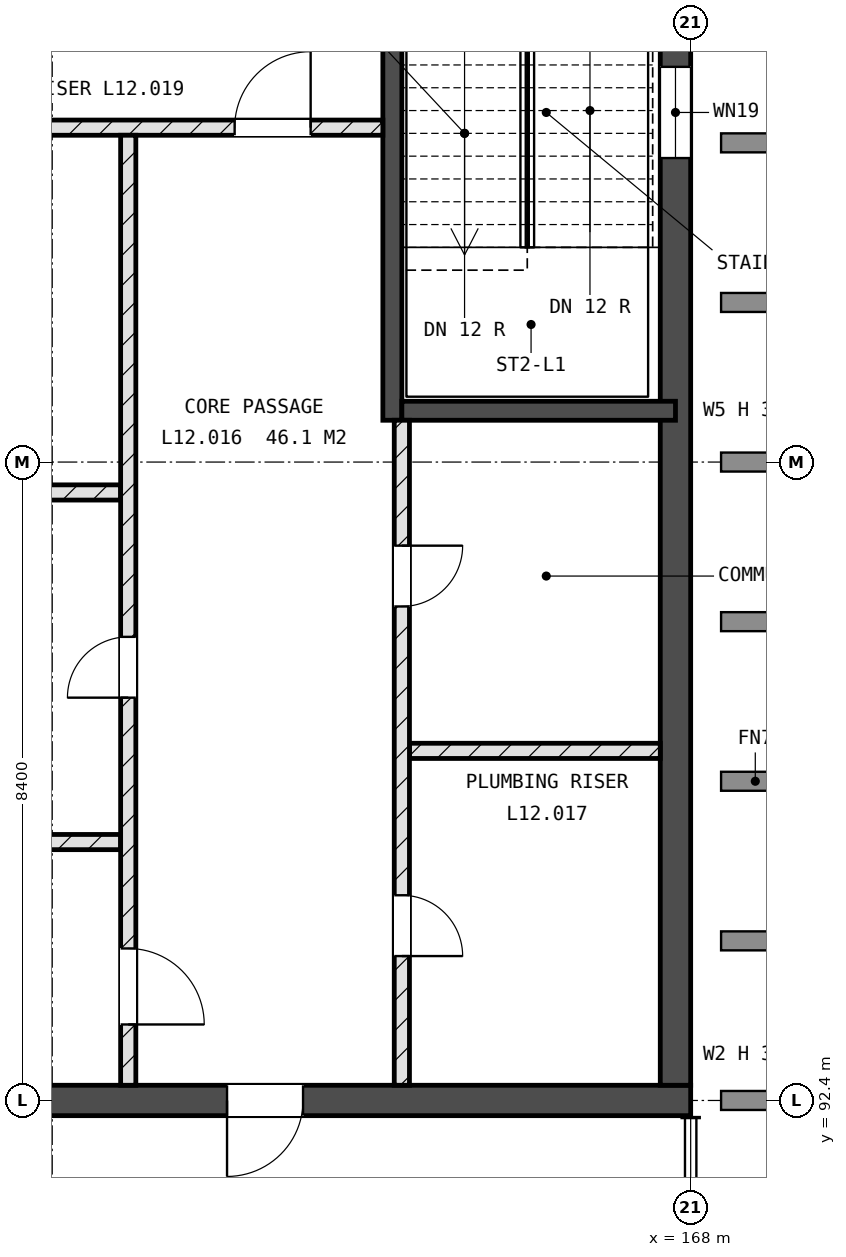
"""IFC4 building model, lengths in metres.
Left out: names, types, materials, properties, quantities, classifications, styles, units other than length and angle.
Written with IfcOpenShell. Run it as: python <this file> out.ifc"""

import sys

from ifc_helpers import new_model, si_unit, direction, frame, frame_2d, origin, place, context, subcontext, project, spatial, rectangle, extrude, element, fill, save


model = new_model("IFC4")
c1 = context("Model", 3, precision=1e-05, world=origin(), true_north=direction((0.0, 1.0)))
c2 = subcontext(c1, "Body", "Model", "MODEL_VIEW")
j1 = project(units=[si_unit("LENGTHUNIT", "METRE"), si_unit("PLANEANGLEUNIT", "RADIAN")], contexts=[c1])
p1 = place(None, origin())
s1 = spatial("IfcSite", under=j1, at=p1, CompositionType="ELEMENT")
p2 = place(p1, origin())
s2 = spatial("IfcBuilding", under=s1, at=p2, CompositionType="ELEMENT")
p3 = place(p2, frame((0.0, 0.0, 46.8)))
s3 = spatial("IfcBuildingStorey", under=s2, at=p3, CompositionType="ELEMENT", Elevation=46.8)
p4 = place(p3, frame((142.8, 92.4, -0.225), z_axis=(0.0, 0.0, 1.0), x_axis=(1.0, 0.0, 0.0)))
e1 = element("IfcWall", 1, at=p4, inside=s3, PredefinedType="SHEAR", context=c2, shape_type="SweptSolid", body=[
    extrude(rectangle(XDim=25.2, YDim=0.4, at=frame_2d((12.6, 0.0))), origin(), (0.0, 0.0, 1.0), 3.525),
])
p5 = place(p4, frame((1.4, 0.0, 0.225)))
e2 = element("IfcOpeningElement", 2, at=p5, cuts=e1, PredefinedType="OPENING", context=c2, shape_type="SweptSolid", body=[
    extrude(rectangle(XDim=1.0, YDim=2.1, at=frame_2d((0.5, 1.05))), frame((0.0, 0.21, 0.0), z_axis=(0.0, -1.0, 0.0), x_axis=(1.0, 0.0, 0.0)), (0.0, 0.0, 1.0), 0.42),
])
p6 = place(p4, frame((19.1, 0.0, 0.225)))
e3 = element("IfcOpeningElement", 3, at=p6, cuts=e1, PredefinedType="OPENING", context=c2, shape_type="SweptSolid", body=[
    extrude(rectangle(XDim=1.0, YDim=2.1, at=frame_2d((0.5, 1.05))), frame((0.0, 0.21, 0.0), z_axis=(0.0, -1.0, 0.0), x_axis=(1.0, 0.0, 0.0)), (0.0, 0.0, 1.0), 0.42),
])
p7 = place(p4, frame((10.4, 0.0, 0.225)))
e4 = element("IfcOpeningElement", 4, at=p7, cuts=e1, PredefinedType="OPENING", context=c2, shape_type="SweptSolid", body=[
    extrude(rectangle(XDim=1.0, YDim=2.1, at=frame_2d((0.5, 1.05))), frame((0.0, 0.21, 0.0), z_axis=(0.0, -1.0, 0.0), x_axis=(1.0, 0.0, 0.0)), (0.0, 0.0, 1.0), 0.42),
])
p8 = place(p3, frame((167.8, 92.6, -0.225), z_axis=(0.0, 0.0, 1.0), x_axis=(0.0, 1.0, 0.0)))
e5 = element("IfcWall", 5, at=p8, inside=s3, PredefinedType="SHEAR", context=c2, shape_type="SweptSolid", body=[
    extrude(rectangle(XDim=16.4, YDim=0.4, at=frame_2d((8.2, 0.0))), origin(), (0.0, 0.0, 1.0), 3.525),
])
p9 = place(p8, frame((12.2, 0.0, 1.825)))
e6 = element("IfcOpeningElement", 6, at=p9, cuts=e5, PredefinedType="OPENING", context=c2, shape_type="SweptSolid", body=[
    extrude(rectangle(XDim=1.2, YDim=0.9, at=frame_2d((0.6, 0.45))), frame((0.0, 0.21, 0.0), z_axis=(0.0, -1.0, 0.0), x_axis=(1.0, 0.0, 0.0)), (0.0, 0.0, 1.0), 0.42),
])
p10 = place(p3, frame((164.075, 101.35, -0.225), z_axis=(0.0, 0.0, 1.0), x_axis=(0.0, 1.0, 0.0)))
e7 = element("IfcWall", 7, at=p10, inside=s3, PredefinedType="SHEAR", context=c2, shape_type="SweptSolid", body=[
    extrude(rectangle(XDim=7.65, YDim=0.25, at=frame_2d((3.825, 0.0))), origin(), (0.0, 0.0, 1.0), 3.525),
])
p11 = place(p10, frame((6.55, 0.0, 0.225)))
e8 = element("IfcOpeningElement", 8, at=p11, cuts=e7, PredefinedType="OPENING", context=c2, shape_type="SweptSolid", body=[
    extrude(rectangle(XDim=1.0, YDim=2.1, at=frame_2d((0.5, 1.05))), frame((0.0, 0.135, 0.0), z_axis=(0.0, -1.0, 0.0), x_axis=(1.0, 0.0, 0.0)), (0.0, 0.0, 1.0), 0.27),
])
p12 = place(p3, frame((164.2, 101.475, -0.225), z_axis=(0.0, 0.0, 1.0), x_axis=(1.0, 0.0, 0.0)))
e9 = element("IfcWall", 9, at=p12, inside=s3, PredefinedType="SHEAR", context=c2, shape_type="SweptSolid", body=[
    extrude(rectangle(XDim=3.6, YDim=0.25, at=frame_2d((1.8, 0.0))), origin(), (0.0, 0.0, 1.0), 3.525),
])
p13 = place(p3, frame((158.25, 95.8, 0.0), z_axis=(0.0, 0.0, 1.0), x_axis=(1.0, 0.0, 0.0)))
e10 = element("IfcWall", 10, at=p13, inside=s3, PredefinedType="SOLIDWALL", context=c2, shape_type="SweptSolid", body=[
    extrude(rectangle(XDim=2.25, YDim=0.2, at=frame_2d((1.125, 0.0))), origin(), (0.0, 0.0, 1.0), 3.3),
])
p14 = place(p3, frame((164.3, 97.0, 0.0), z_axis=(0.0, 0.0, 1.0), x_axis=(1.0, 0.0, 0.0)))
e11 = element("IfcWall", 11, at=p14, inside=s3, PredefinedType="SOLIDWALL", context=c2, shape_type="SweptSolid", body=[
    extrude(rectangle(XDim=3.3, YDim=0.2, at=frame_2d((1.65, 0.0))), origin(), (0.0, 0.0, 1.0), 3.3),
])
p15 = place(p3, frame((146.5, 100.4, 0.0), z_axis=(0.0, 0.0, 1.0), x_axis=(1.0, 0.0, 0.0)))
e12 = element("IfcWall", 12, at=p15, inside=s3, PredefinedType="SOLIDWALL", context=c2, shape_type="SweptSolid", body=[
    extrude(rectangle(XDim=14.0, YDim=0.2, at=frame_2d((7.0, 0.0))), origin(), (0.0, 0.0, 1.0), 3.3),
])
p16 = place(p3, frame((143.2, 105.2, 0.0), z_axis=(0.0, 0.0, 1.0), x_axis=(1.0, 0.0, 0.0)))
e13 = element("IfcWall", 13, at=p16, inside=s3, PredefinedType="SOLIDWALL", context=c2, shape_type="SweptSolid", body=[
    extrude(rectangle(XDim=20.75, YDim=0.2, at=frame_2d((10.375, 0.0))), origin(), (0.0, 0.0, 1.0), 3.3),
])
p17 = place(p16, frame((11.5, 0.0, 0.0)))
e14 = element("IfcOpeningElement", 14, at=p17, cuts=e13, PredefinedType="OPENING", context=c2, shape_type="SweptSolid", body=[
    extrude(rectangle(XDim=0.8, YDim=2.1, at=frame_2d((0.4, 1.05))), frame((0.0, 0.11, 0.0), z_axis=(0.0, -1.0, 0.0), x_axis=(1.0, 0.0, 0.0)), (0.0, 0.0, 1.0), 0.22),
])
p18 = place(p16, frame((18.8, 0.0, 0.0)))
e15 = element("IfcOpeningElement", 15, at=p18, cuts=e13, PredefinedType="OPENING", context=c2, shape_type="SweptSolid", body=[
    extrude(rectangle(XDim=1.0, YDim=2.1, at=frame_2d((0.5, 1.05))), frame((0.0, 0.11, 0.0), z_axis=(0.0, -1.0, 0.0), x_axis=(1.0, 0.0, 0.0)), (0.0, 0.0, 1.0), 0.22),
])
p19 = place(p3, frame((160.6, 92.6, 0.0), z_axis=(0.0, 0.0, 1.0), x_axis=(0.0, 1.0, 0.0)))
e16 = element("IfcWall", 16, at=p19, inside=s3, PredefinedType="SOLIDWALL", context=c2, shape_type="SweptSolid", body=[
    extrude(rectangle(XDim=12.5, YDim=0.2, at=frame_2d((6.25, 0.0))), origin(), (0.0, 0.0, 1.0), 3.3),
])
p20 = place(p19, frame((5.1, 0.0, 0.0)))
e17 = element("IfcOpeningElement", 17, at=p20, cuts=e16, PredefinedType="OPENING", context=c2, shape_type="SweptSolid", body=[
    extrude(rectangle(XDim=0.8, YDim=2.1, at=frame_2d((0.4, 1.05))), frame((0.0, 0.11, 0.0), z_axis=(0.0, -1.0, 0.0), x_axis=(1.0, 0.0, 0.0)), (0.0, 0.0, 1.0), 0.22),
])
p21 = place(p19, frame((0.8, 0.0, 0.0)))
e18 = element("IfcOpeningElement", 18, at=p21, cuts=e16, PredefinedType="OPENING", context=c2, shape_type="SweptSolid", body=[
    extrude(rectangle(XDim=1.0, YDim=2.1, at=frame_2d((0.5, 1.05))), frame((0.0, 0.11, 0.0), z_axis=(0.0, -1.0, 0.0), x_axis=(1.0, 0.0, 0.0)), (0.0, 0.0, 1.0), 0.22),
])
p22 = place(p3, frame((164.2, 92.6, 0.0), z_axis=(0.0, 0.0, 1.0), x_axis=(0.0, 1.0, 0.0)))
e19 = element("IfcWall", 19, at=p22, inside=s3, PredefinedType="SOLIDWALL", context=c2, shape_type="SweptSolid", body=[
    extrude(rectangle(XDim=8.75, YDim=0.2, at=frame_2d((4.375, 0.0))), origin(), (0.0, 0.0, 1.0), 3.3),
])
p23 = place(p22, frame((1.7, 0.0, 0.0)))
e20 = element("IfcOpeningElement", 20, at=p23, cuts=e19, PredefinedType="OPENING", context=c2, shape_type="SweptSolid", body=[
    extrude(rectangle(XDim=0.8, YDim=2.1, at=frame_2d((0.4, 1.05))), frame((0.0, 0.11, 0.0), z_axis=(0.0, -1.0, 0.0), x_axis=(1.0, 0.0, 0.0)), (0.0, 0.0, 1.0), 0.22),
])
p24 = place(p22, frame((6.3, 0.0, 0.0)))
e21 = element("IfcOpeningElement", 21, at=p24, cuts=e19, PredefinedType="OPENING", context=c2, shape_type="SweptSolid", body=[
    extrude(rectangle(XDim=0.8, YDim=2.1, at=frame_2d((0.4, 1.05))), frame((0.0, 0.11, 0.0), z_axis=(0.0, -1.0, 0.0), x_axis=(1.0, 0.0, 0.0)), (0.0, 0.0, 1.0), 0.22),
])
p25 = place(p9, origin())
e22 = element("IfcWindow", 22, at=p25, inside=s3, PartitioningType="SINGLE_PANEL", PredefinedType="WINDOW", context=c2, shape_type="SweptSolid", body=[
    extrude(rectangle(XDim=1.2, YDim=0.9, at=frame_2d((0.6, 0.45))), frame((0.0, 0.03, 0.0), z_axis=(0.0, -1.0, 0.0), x_axis=(1.0, 0.0, 0.0)), (0.0, 0.0, 1.0), 0.06),
])
fill(e6, e22)
p26 = place(p23, origin())
e23 = element("IfcDoor", 23, at=p26, inside=s3, OperationType="SINGLE_SWING_LEFT", PredefinedType="DOOR", context=c2, shape_type="SweptSolid", body=[
    extrude(rectangle(XDim=0.8, YDim=2.1, at=frame_2d((0.4, 1.05))), frame((0.0, 0.025, 0.0), z_axis=(0.0, -1.0, 0.0), x_axis=(1.0, 0.0, 0.0)), (0.0, 0.0, 1.0), 0.05),
])
fill(e20, e23)
p27 = place(p24, origin())
e24 = element("IfcDoor", 24, at=p27, inside=s3, OperationType="SINGLE_SWING_RIGHT", PredefinedType="DOOR", context=c2, shape_type="SweptSolid", body=[
    extrude(rectangle(XDim=0.8, YDim=2.1, at=frame_2d((0.4, 1.05))), frame((0.0, 0.025, 0.0), z_axis=(0.0, -1.0, 0.0), x_axis=(1.0, 0.0, 0.0)), (0.0, 0.0, 1.0), 0.05),
])
fill(e21, e24)
p28 = place(p20, origin())
e25 = element("IfcDoor", 25, at=p28, inside=s3, OperationType="SINGLE_SWING_RIGHT", PredefinedType="DOOR", context=c2, shape_type="SweptSolid", body=[
    extrude(rectangle(XDim=0.8, YDim=2.1, at=frame_2d((0.4, 1.05))), frame((0.0, 0.025, 0.0), z_axis=(0.0, -1.0, 0.0), x_axis=(1.0, 0.0, 0.0)), (0.0, 0.0, 1.0), 0.05),
])
fill(e17, e25)
p29 = place(p6, origin())
e26 = element("IfcDoor", 26, at=p29, inside=s3, OperationType="SINGLE_SWING_LEFT", PredefinedType="DOOR", context=c2, shape_type="SweptSolid", body=[
    extrude(rectangle(XDim=1.0, YDim=2.1, at=frame_2d((0.5, 1.05))), frame((0.0, 0.025, 0.0), z_axis=(0.0, -1.0, 0.0), x_axis=(1.0, 0.0, 0.0)), (0.0, 0.0, 1.0), 0.05),
])
fill(e3, e26)
p30 = place(p21, origin())
e27 = element("IfcDoor", 27, at=p30, inside=s3, OperationType="SINGLE_SWING_LEFT", PredefinedType="DOOR", context=c2, shape_type="SweptSolid", body=[
    extrude(rectangle(XDim=1.0, YDim=2.1, at=frame_2d((0.5, 1.05))), frame((0.0, 0.025, 0.0), z_axis=(0.0, -1.0, 0.0), x_axis=(1.0, 0.0, 0.0)), (0.0, 0.0, 1.0), 0.05),
])
fill(e18, e27)
p31 = place(p18, origin())
e28 = element("IfcDoor", 28, at=p31, inside=s3, OperationType="SINGLE_SWING_LEFT", PredefinedType="DOOR", context=c2, shape_type="SweptSolid", body=[
    extrude(rectangle(XDim=1.0, YDim=2.1, at=frame_2d((0.5, 1.05))), frame((0.0, 0.025, 0.0), z_axis=(0.0, -1.0, 0.0), x_axis=(1.0, 0.0, 0.0)), (0.0, 0.0, 1.0), 0.05),
])
fill(e15, e28)
save(model, sys.argv[1])
